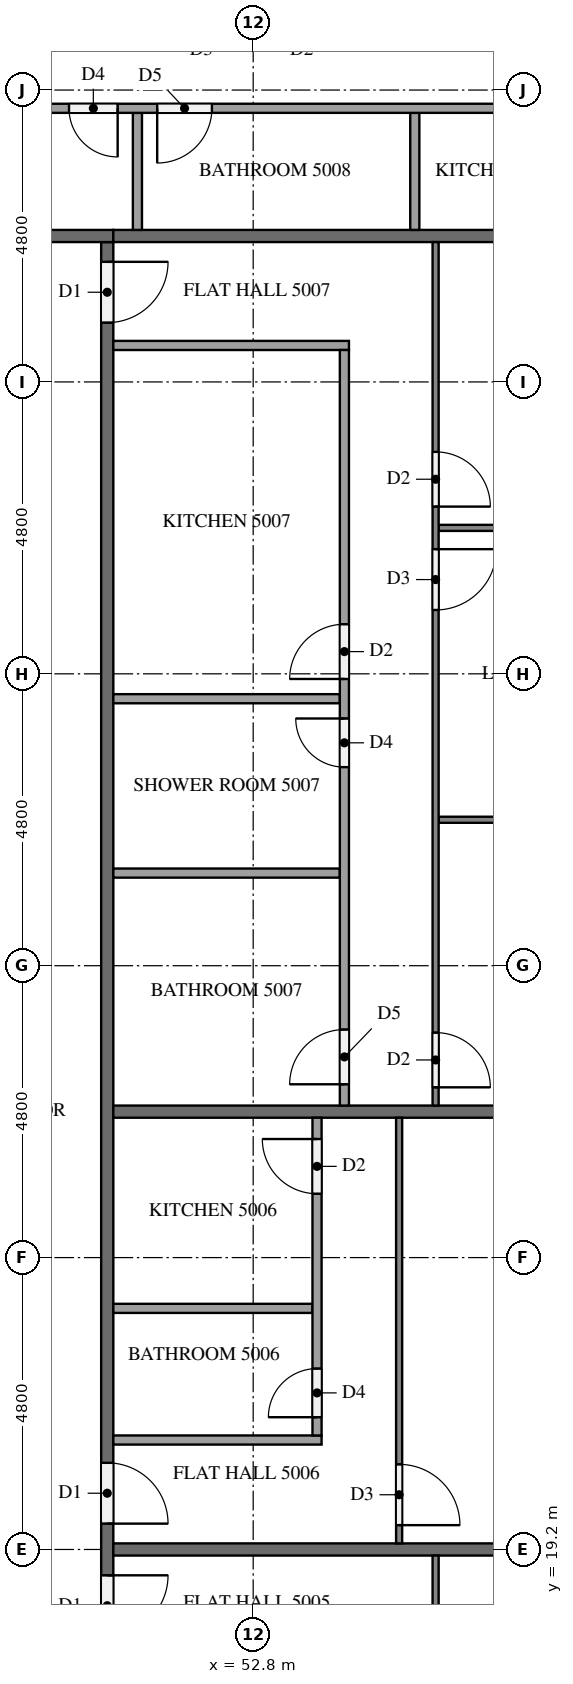
"""IFC4 building model, lengths in metres.
Left out: names, types, materials, properties, quantities, classifications, styles, units other than length and angle.
Written with IfcOpenShell. Run it as: python <this file> out.ifc"""

import sys

from ifc_helpers import new_model, si_unit, direction, frame, frame_2d, origin, place, context, subcontext, project, spatial, rectangle, extrude, element, fill, save


model = new_model("IFC4")
c1 = context("Model", 3, precision=1e-05, world=origin(), true_north=direction((0.0, 1.0)))
c2 = subcontext(c1, "Body", "Model", "MODEL_VIEW")
j1 = project(units=[si_unit("LENGTHUNIT", "METRE"), si_unit("PLANEANGLEUNIT", "RADIAN")], contexts=[c1])
p1 = place(None, origin())
s1 = spatial("IfcSite", under=j1, at=p1, CompositionType="ELEMENT")
p2 = place(p1, origin())
s2 = spatial("IfcBuilding", under=s1, at=p2, CompositionType="ELEMENT")
p3 = place(p2, frame((0.0, 0.0, 192.9)))
s3 = spatial("IfcBuildingStorey", under=s2, at=p3, CompositionType="ELEMENT", Elevation=192.9)
p4 = place(p3, frame((50.4, 40.7, 0.0), z_axis=(0.0, 0.0, 1.0), x_axis=(0.0, -1.0, 0.0)))
e1 = element("IfcWall", 1, at=p4, inside=s3, PredefinedType="PARTITIONING", context=c2, shape_type="SweptSolid", body=[
    extrude(rectangle(XDim=28.6, YDim=0.2, at=frame_2d((14.3, 0.0))), origin(), (0.0, 0.0, 1.0), 3.2),
])
p5 = place(p4, frame((21.925, 0.0, 0.0)))
e2 = element("IfcOpeningElement", 2, at=p5, cuts=e1, PredefinedType="OPENING", context=c2, shape_type="SweptSolid", body=[
    extrude(rectangle(XDim=1.0, YDim=2.1, at=frame_2d((0.5, 1.05))), frame((0.0, 0.11, 0.0), z_axis=(0.0, -1.0, 0.0), x_axis=(1.0, 0.0, 0.0)), (0.0, 0.0, 1.0), 0.22),
])
p6 = place(p4, frame((20.075, 0.0, 0.0)))
e3 = element("IfcOpeningElement", 3, at=p6, cuts=e1, PredefinedType="OPENING", context=c2, shape_type="SweptSolid", body=[
    extrude(rectangle(XDim=1.0, YDim=2.1, at=frame_2d((0.5, 1.05))), frame((0.0, 0.11, 0.0), z_axis=(0.0, -1.0, 0.0), x_axis=(1.0, 0.0, 0.0)), (0.0, 0.0, 1.0), 0.22),
])
p7 = place(p4, frame((0.325, 0.0, 0.0)))
e4 = element("IfcOpeningElement", 4, at=p7, cuts=e1, PredefinedType="OPENING", context=c2, shape_type="SweptSolid", body=[
    extrude(rectangle(XDim=1.0, YDim=2.1, at=frame_2d((0.5, 1.05))), frame((0.0, 0.11, 0.0), z_axis=(0.0, -1.0, 0.0), x_axis=(1.0, 0.0, 0.0)), (0.0, 0.0, 1.0), 0.22),
])
p8 = place(p3, frame((11.9, 40.8, 0.0), z_axis=(0.0, 0.0, 1.0), x_axis=(1.0, 0.0, 0.0)))
e5 = element("IfcWall", 5, at=p8, inside=s3, PredefinedType="PARTITIONING", context=c2, shape_type="SweptSolid", body=[
    extrude(rectangle(XDim=38.6, YDim=0.2, at=frame_2d((19.3, 0.0))), origin(), (0.0, 0.0, 1.0), 3.2),
])
p9 = place(p8, frame((34.125, 0.0, 0.0)))
e6 = element("IfcOpeningElement", 6, at=p9, cuts=e5, PredefinedType="OPENING", context=c2, shape_type="SweptSolid", body=[
    extrude(rectangle(XDim=1.0, YDim=2.1, at=frame_2d((0.5, 1.05))), frame((0.0, 0.11, 0.0), z_axis=(0.0, -1.0, 0.0), x_axis=(1.0, 0.0, 0.0)), (0.0, 0.0, 1.0), 0.22),
])
p10 = place(p8, frame((24.525, 0.0, 0.0)))
e7 = element("IfcOpeningElement", 7, at=p10, cuts=e5, PredefinedType="OPENING", context=c2, shape_type="SweptSolid", body=[
    extrude(rectangle(XDim=1.0, YDim=2.1, at=frame_2d((0.5, 1.05))), frame((0.0, 0.11, 0.0), z_axis=(0.0, -1.0, 0.0), x_axis=(1.0, 0.0, 0.0)), (0.0, 0.0, 1.0), 0.22),
])
p11 = place(p8, frame((7.725, 0.0, 0.0)))
e8 = element("IfcOpeningElement", 8, at=p11, cuts=e5, PredefinedType="OPENING", context=c2, shape_type="SweptSolid", body=[
    extrude(rectangle(XDim=1.0, YDim=2.1, at=frame_2d((0.5, 1.05))), frame((0.0, 0.11, 0.0), z_axis=(0.0, -1.0, 0.0), x_axis=(1.0, 0.0, 0.0)), (0.0, 0.0, 1.0), 0.22),
])
p12 = place(p8, frame((5.875, 0.0, 0.0)))
e9 = element("IfcOpeningElement", 9, at=p12, cuts=e5, PredefinedType="OPENING", context=c2, shape_type="SweptSolid", body=[
    extrude(rectangle(XDim=1.0, YDim=2.1, at=frame_2d((0.5, 1.05))), frame((0.0, 0.11, 0.0), z_axis=(0.0, -1.0, 0.0), x_axis=(1.0, 0.0, 0.0)), (0.0, 0.0, 1.0), 0.22),
])
for number, where, z_axis, x_axis in (
    (10, (50.5, 19.2, 0.0), (0.0, 0.0, 1.0), (1.0, 0.0, 0.0)),
    (11, (50.5, 26.4, 0.0), (0.0, 0.0, 1.0), (1.0, 0.0, 0.0)),
    (12, (50.5, 40.8, 0.0), (0.0, 0.0, 1.0), (1.0, 0.0, 0.0)),
):
    element("IfcWall", number, at=place(p3, frame(where, z_axis=z_axis, x_axis=x_axis)), inside=s3, PredefinedType="PARTITIONING", context=c2, shape_type="SweptSolid", body=[
        extrude(rectangle(XDim=11.8, YDim=0.2, at=frame_2d((5.9, 0.0))), origin(), (0.0, 0.0, 1.0), 3.2),
    ])
p13 = place(p3, frame((55.8, 19.1, 0.0), z_axis=(0.0, 0.0, 1.0), x_axis=(0.0, -1.0, 0.0)))
e13 = element("IfcWall", 13, at=p13, inside=s3, PredefinedType="PARTITIONING", context=c2, shape_type="SweptSolid", body=[
    extrude(rectangle(XDim=7.0, YDim=0.1, at=frame_2d((3.5, 0.0))), origin(), (0.0, 0.0, 1.0), 3.2),
])
p14 = place(p13, frame((5.7, 0.0, 0.0)))
e14 = element("IfcOpeningElement", 14, at=p14, cuts=e13, PredefinedType="OPENING", context=c2, shape_type="SweptSolid", body=[
    extrude(rectangle(XDim=1.0, YDim=2.1, at=frame_2d((0.5, 1.05))), frame((0.0, 0.06, 0.0), z_axis=(0.0, -1.0, 0.0), x_axis=(1.0, 0.0, 0.0)), (0.0, 0.0, 1.0), 0.12),
])
p15 = place(p3, frame((55.2, 26.3, 0.0), z_axis=(0.0, 0.0, 1.0), x_axis=(0.0, -1.0, 0.0)))
e15 = element("IfcWall", 15, at=p15, inside=s3, PredefinedType="PARTITIONING", context=c2, shape_type="SweptSolid", body=[
    extrude(rectangle(XDim=7.0, YDim=0.1, at=frame_2d((3.5, 0.0))), origin(), (0.0, 0.0, 1.0), 3.2),
])
p16 = place(p15, frame((5.7, 0.0, 0.0)))
e16 = element("IfcOpeningElement", 16, at=p16, cuts=e15, PredefinedType="OPENING", context=c2, shape_type="SweptSolid", body=[
    extrude(rectangle(XDim=1.0, YDim=2.1, at=frame_2d((0.5, 1.05))), frame((0.0, 0.06, 0.0), z_axis=(0.0, -1.0, 0.0), x_axis=(1.0, 0.0, 0.0)), (0.0, 0.0, 1.0), 0.12),
])
p17 = place(p3, frame((50.5, 23.165, 0.0), z_axis=(0.0, 0.0, 1.0), x_axis=(1.0, 0.0, 0.0)))
e17 = element("IfcWall", 17, at=p17, inside=s3, PredefinedType="PARTITIONING", context=c2, shape_type="SweptSolid", body=[
    extrude(rectangle(XDim=3.275, YDim=0.15, at=frame_2d((1.637, 0.0))), origin(), (0.0, 0.0, 1.0), 3.2),
])
p18 = place(p3, frame((50.5, 21.0, 0.0), z_axis=(0.0, 0.0, 1.0), x_axis=(1.0, 0.0, 0.0)))
e18 = element("IfcWall", 18, at=p18, inside=s3, PredefinedType="PARTITIONING", context=c2, shape_type="SweptSolid", body=[
    extrude(rectangle(XDim=3.425, YDim=0.15, at=frame_2d((1.712, 0.0))), origin(), (0.0, 0.0, 1.0), 3.2),
])
p19 = place(p3, frame((53.85, 21.075, 0.0), z_axis=(0.0, 0.0, 1.0), x_axis=(0.0, 1.0, 0.0)))
e19 = element("IfcWall", 19, at=p19, inside=s3, PredefinedType="PARTITIONING", context=c2, shape_type="SweptSolid", body=[
    extrude(rectangle(XDim=5.225, YDim=0.15, at=frame_2d((2.613, 0.0))), origin(), (0.0, 0.0, 1.0), 3.2),
])
p20 = place(p19, frame((0.3, 0.0, 0.0)))
e20 = element("IfcOpeningElement", 20, at=p20, cuts=e19, PredefinedType="OPENING", context=c2, shape_type="SweptSolid", body=[
    extrude(rectangle(XDim=0.8, YDim=2.1, at=frame_2d((0.4, 1.05))), frame((0.0, 0.085, 0.0), z_axis=(0.0, -1.0, 0.0), x_axis=(1.0, 0.0, 0.0)), (0.0, 0.0, 1.0), 0.17),
])
p21 = place(p19, frame((3.975, 0.0, 0.0)))
e21 = element("IfcOpeningElement", 21, at=p21, cuts=e19, PredefinedType="OPENING", context=c2, shape_type="SweptSolid", body=[
    extrude(rectangle(XDim=0.9, YDim=2.1, at=frame_2d((0.45, 1.05))), frame((0.0, 0.085, 0.0), z_axis=(0.0, -1.0, 0.0), x_axis=(1.0, 0.0, 0.0)), (0.0, 0.0, 1.0), 0.17),
])
for number, where, z_axis, x_axis in (
    (22, (55.85, 36.0, 0.0), (0.0, 0.0, 1.0), (1.0, 0.0, 0.0)),
    (23, (55.85, 31.2, 0.0), (0.0, 0.0, 1.0), (1.0, 0.0, 0.0)),
):
    element("IfcWall", number, at=place(p3, frame(where, z_axis=z_axis, x_axis=x_axis)), inside=s3, PredefinedType="PARTITIONING", context=c2, shape_type="SweptSolid", body=[
        extrude(rectangle(XDim=6.45, YDim=0.1, at=frame_2d((3.225, 0.0))), origin(), (0.0, 0.0, 1.0), 3.2),
    ])
p22 = place(p3, frame((55.8, 40.7, 0.0), z_axis=(0.0, 0.0, 1.0), x_axis=(0.0, -1.0, 0.0)))
e24 = element("IfcWall", 24, at=p22, inside=s3, PredefinedType="PARTITIONING", context=c2, shape_type="SweptSolid", body=[
    extrude(rectangle(XDim=14.2, YDim=0.1, at=frame_2d((7.1, 0.0))), origin(), (0.0, 0.0, 1.0), 3.2),
])
p23 = place(p22, frame((3.45, 0.0, 0.0)))
e25 = element("IfcOpeningElement", 25, at=p23, cuts=e24, PredefinedType="OPENING", context=c2, shape_type="SweptSolid", body=[
    extrude(rectangle(XDim=0.9, YDim=2.1, at=frame_2d((0.45, 1.05))), frame((0.0, 0.06, 0.0), z_axis=(0.0, -1.0, 0.0), x_axis=(1.0, 0.0, 0.0)), (0.0, 0.0, 1.0), 0.12),
])
p24 = place(p22, frame((5.05, 0.0, 0.0)))
e26 = element("IfcOpeningElement", 26, at=p24, cuts=e24, PredefinedType="OPENING", context=c2, shape_type="SweptSolid", body=[
    extrude(rectangle(XDim=1.0, YDim=2.1, at=frame_2d((0.5, 1.05))), frame((0.0, 0.06, 0.0), z_axis=(0.0, -1.0, 0.0), x_axis=(1.0, 0.0, 0.0)), (0.0, 0.0, 1.0), 0.12),
])
p25 = place(p22, frame((13.0, 0.0, 0.0)))
e27 = element("IfcOpeningElement", 27, at=p25, cuts=e24, PredefinedType="OPENING", context=c2, shape_type="SweptSolid", body=[
    extrude(rectangle(XDim=0.9, YDim=2.1, at=frame_2d((0.45, 1.05))), frame((0.0, 0.06, 0.0), z_axis=(0.0, -1.0, 0.0), x_axis=(1.0, 0.0, 0.0)), (0.0, 0.0, 1.0), 0.12),
])
for number, where, z_axis, x_axis in (
    (28, (50.5, 33.19, 0.0), (0.0, 0.0, 1.0), (1.0, 0.0, 0.0)),
    (29, (50.5, 30.323, 0.0), (0.0, 0.0, 1.0), (1.0, 0.0, 0.0)),
):
    element("IfcWall", number, at=place(p3, frame(where, z_axis=z_axis, x_axis=x_axis)), inside=s3, PredefinedType="PARTITIONING", context=c2, shape_type="SweptSolid", body=[
        extrude(rectangle(XDim=3.725, YDim=0.15, at=frame_2d((1.863, 0.0))), origin(), (0.0, 0.0, 1.0), 3.2),
    ])
p26 = place(p3, frame((50.5, 39.0, 0.0), z_axis=(0.0, 0.0, 1.0), x_axis=(1.0, 0.0, 0.0)))
e30 = element("IfcWall", 30, at=p26, inside=s3, PredefinedType="PARTITIONING", context=c2, shape_type="SweptSolid", body=[
    extrude(rectangle(XDim=3.875, YDim=0.15, at=frame_2d((1.938, 0.0))), origin(), (0.0, 0.0, 1.0), 3.2),
])
p27 = place(p3, frame((54.3, 26.5, 0.0), z_axis=(0.0, 0.0, 1.0), x_axis=(0.0, 1.0, 0.0)))
e31 = element("IfcWall", 31, at=p27, inside=s3, PredefinedType="PARTITIONING", context=c2, shape_type="SweptSolid", body=[
    extrude(rectangle(XDim=12.425, YDim=0.15, at=frame_2d((6.212, 0.0))), origin(), (0.0, 0.0, 1.0), 3.2),
])
p28 = place(p27, frame((7.015, 0.0, 0.0)))
e32 = element("IfcOpeningElement", 32, at=p28, cuts=e31, PredefinedType="OPENING", context=c2, shape_type="SweptSolid", body=[
    extrude(rectangle(XDim=0.9, YDim=2.1, at=frame_2d((0.45, 1.05))), frame((0.0, 0.085, 0.0), z_axis=(0.0, -1.0, 0.0), x_axis=(1.0, 0.0, 0.0)), (0.0, 0.0, 1.0), 0.17),
])
p29 = place(p27, frame((5.565, 0.0, 0.0)))
e33 = element("IfcOpeningElement", 33, at=p29, cuts=e31, PredefinedType="OPENING", context=c2, shape_type="SweptSolid", body=[
    extrude(rectangle(XDim=0.8, YDim=2.1, at=frame_2d((0.4, 1.05))), frame((0.0, 0.085, 0.0), z_axis=(0.0, -1.0, 0.0), x_axis=(1.0, 0.0, 0.0)), (0.0, 0.0, 1.0), 0.17),
])
p30 = place(p27, frame((0.35, 0.0, 0.0)))
e34 = element("IfcOpeningElement", 34, at=p30, cuts=e31, PredefinedType="OPENING", context=c2, shape_type="SweptSolid", body=[
    extrude(rectangle(XDim=0.9, YDim=2.1, at=frame_2d((0.45, 1.05))), frame((0.0, 0.085, 0.0), z_axis=(0.0, -1.0, 0.0), x_axis=(1.0, 0.0, 0.0)), (0.0, 0.0, 1.0), 0.17),
])
for number, where, z_axis, x_axis in (
    (35, (50.896, 40.9, 0.0), (0.0, 0.0, 1.0), (0.0, 1.0, 0.0)),
    (36, (55.458, 40.9, 0.0), (0.0, 0.0, 1.0), (0.0, 1.0, 0.0)),
):
    element("IfcWall", number, at=place(p3, frame(where, z_axis=z_axis, x_axis=x_axis)), inside=s3, PredefinedType="PARTITIONING", context=c2, shape_type="SweptSolid", body=[
        extrude(rectangle(XDim=1.925, YDim=0.15, at=frame_2d((0.962, 0.0))), origin(), (0.0, 0.0, 1.0), 3.2),
    ])
p31 = place(p3, frame((61.925, 42.9, 0.0), z_axis=(0.0, 0.0, 1.0), x_axis=(-1.0, 0.0, 0.0)))
e37 = element("IfcWall", 37, at=p31, inside=s3, PredefinedType="PARTITIONING", context=c2, shape_type="SweptSolid", body=[
    extrude(rectangle(XDim=14.45, YDim=0.15, at=frame_2d((7.225, 0.0))), origin(), (0.0, 0.0, 1.0), 3.2),
])
p32 = place(p31, frame((11.354, 0.0, 0.0)))
e38 = element("IfcOpeningElement", 38, at=p32, cuts=e37, PredefinedType="OPENING", context=c2, shape_type="SweptSolid", body=[
    extrude(rectangle(XDim=0.8, YDim=2.1, at=frame_2d((0.4, 1.05))), frame((0.0, 0.085, 0.0), z_axis=(0.0, -1.0, 0.0), x_axis=(1.0, 0.0, 0.0)), (0.0, 0.0, 1.0), 0.17),
])
p33 = place(p31, frame((9.804, 0.0, 0.0)))
e39 = element("IfcOpeningElement", 39, at=p33, cuts=e37, PredefinedType="OPENING", context=c2, shape_type="SweptSolid", body=[
    extrude(rectangle(XDim=0.9, YDim=2.1, at=frame_2d((0.45, 1.05))), frame((0.0, 0.085, 0.0), z_axis=(0.0, -1.0, 0.0), x_axis=(1.0, 0.0, 0.0)), (0.0, 0.0, 1.0), 0.17),
])
p34 = place(p31, frame((0.3, 0.0, 0.0)))
e40 = element("IfcOpeningElement", 40, at=p34, cuts=e37, PredefinedType="OPENING", context=c2, shape_type="SweptSolid", body=[
    extrude(rectangle(XDim=0.9, YDim=2.1, at=frame_2d((0.45, 1.05))), frame((0.0, 0.085, 0.0), z_axis=(0.0, -1.0, 0.0), x_axis=(1.0, 0.0, 0.0)), (0.0, 0.0, 1.0), 0.17),
])
p35 = place(p5, origin())
e41 = element("IfcDoor", 41, at=p35, inside=s3, OperationType="SINGLE_SWING_LEFT", PredefinedType="DOOR", context=c2, shape_type="SweptSolid", body=[
    extrude(rectangle(XDim=1.0, YDim=2.1, at=frame_2d((0.5, 1.05))), frame((0.0, 0.025, 0.0), z_axis=(0.0, -1.0, 0.0), x_axis=(1.0, 0.0, 0.0)), (0.0, 0.0, 1.0), 0.05),
])
fill(e2, e41)
p36 = place(p6, origin())
e42 = element("IfcDoor", 42, at=p36, inside=s3, OperationType="SINGLE_SWING_RIGHT", PredefinedType="DOOR", context=c2, shape_type="SweptSolid", body=[
    extrude(rectangle(XDim=1.0, YDim=2.1, at=frame_2d((0.5, 1.05))), frame((0.0, 0.025, 0.0), z_axis=(0.0, -1.0, 0.0), x_axis=(1.0, 0.0, 0.0)), (0.0, 0.0, 1.0), 0.05),
])
fill(e3, e42)
p37 = place(p7, origin())
e43 = element("IfcDoor", 43, at=p37, inside=s3, OperationType="SINGLE_SWING_LEFT", PredefinedType="DOOR", context=c2, shape_type="SweptSolid", body=[
    extrude(rectangle(XDim=1.0, YDim=2.1, at=frame_2d((0.5, 1.05))), frame((0.0, 0.025, 0.0), z_axis=(0.0, -1.0, 0.0), x_axis=(1.0, 0.0, 0.0)), (0.0, 0.0, 1.0), 0.05),
])
fill(e4, e43)
p38 = place(p16, origin())
e44 = element("IfcDoor", 44, at=p38, inside=s3, OperationType="SINGLE_SWING_RIGHT", PredefinedType="DOOR", context=c2, shape_type="SweptSolid", body=[
    extrude(rectangle(XDim=1.0, YDim=2.1, at=frame_2d((0.5, 1.05))), frame((0.0, 0.025, 0.0), z_axis=(0.0, -1.0, 0.0), x_axis=(1.0, 0.0, 0.0)), (0.0, 0.0, 1.0), 0.05),
])
fill(e16, e44)
p39 = place(p20, origin())
e45 = element("IfcDoor", 45, at=p39, inside=s3, OperationType="SINGLE_SWING_LEFT", PredefinedType="DOOR", context=c2, shape_type="SweptSolid", body=[
    extrude(rectangle(XDim=0.8, YDim=2.1, at=frame_2d((0.4, 1.05))), frame((0.0, 0.025, 0.0), z_axis=(0.0, -1.0, 0.0), x_axis=(1.0, 0.0, 0.0)), (0.0, 0.0, 1.0), 0.05),
])
fill(e20, e45)
p40 = place(p21, origin())
e46 = element("IfcDoor", 46, at=p40, inside=s3, OperationType="SINGLE_SWING_RIGHT", PredefinedType="DOOR", context=c2, shape_type="SweptSolid", body=[
    extrude(rectangle(XDim=0.9, YDim=2.1, at=frame_2d((0.45, 1.05))), frame((0.0, 0.025, 0.0), z_axis=(0.0, -1.0, 0.0), x_axis=(1.0, 0.0, 0.0)), (0.0, 0.0, 1.0), 0.05),
])
fill(e21, e46)
p41 = place(p23, origin())
e47 = element("IfcDoor", 47, at=p41, inside=s3, OperationType="SINGLE_SWING_RIGHT", PredefinedType="DOOR", context=c2, shape_type="SweptSolid", body=[
    extrude(rectangle(XDim=0.9, YDim=2.1, at=frame_2d((0.45, 1.05))), frame((0.0, 0.025, 0.0), z_axis=(0.0, -1.0, 0.0), x_axis=(1.0, 0.0, 0.0)), (0.0, 0.0, 1.0), 0.05),
])
fill(e25, e47)
p42 = place(p24, origin())
e48 = element("IfcDoor", 48, at=p42, inside=s3, OperationType="SINGLE_SWING_LEFT", PredefinedType="DOOR", context=c2, shape_type="SweptSolid", body=[
    extrude(rectangle(XDim=1.0, YDim=2.1, at=frame_2d((0.5, 1.05))), frame((0.0, 0.025, 0.0), z_axis=(0.0, -1.0, 0.0), x_axis=(1.0, 0.0, 0.0)), (0.0, 0.0, 1.0), 0.05),
])
fill(e26, e48)
p43 = place(p25, origin())
e49 = element("IfcDoor", 49, at=p43, inside=s3, OperationType="SINGLE_SWING_RIGHT", PredefinedType="DOOR", context=c2, shape_type="SweptSolid", body=[
    extrude(rectangle(XDim=0.9, YDim=2.1, at=frame_2d((0.45, 1.05))), frame((0.0, 0.025, 0.0), z_axis=(0.0, -1.0, 0.0), x_axis=(1.0, 0.0, 0.0)), (0.0, 0.0, 1.0), 0.05),
])
fill(e27, e49)
p44 = place(p28, origin())
e50 = element("IfcDoor", 50, at=p44, inside=s3, OperationType="SINGLE_SWING_LEFT", PredefinedType="DOOR", context=c2, shape_type="SweptSolid", body=[
    extrude(rectangle(XDim=0.9, YDim=2.1, at=frame_2d((0.45, 1.05))), frame((0.0, 0.025, 0.0), z_axis=(0.0, -1.0, 0.0), x_axis=(1.0, 0.0, 0.0)), (0.0, 0.0, 1.0), 0.05),
])
fill(e32, e50)
p45 = place(p29, origin())
e51 = element("IfcDoor", 51, at=p45, inside=s3, OperationType="SINGLE_SWING_RIGHT", PredefinedType="DOOR", context=c2, shape_type="SweptSolid", body=[
    extrude(rectangle(XDim=0.8, YDim=2.1, at=frame_2d((0.4, 1.05))), frame((0.0, 0.025, 0.0), z_axis=(0.0, -1.0, 0.0), x_axis=(1.0, 0.0, 0.0)), (0.0, 0.0, 1.0), 0.05),
])
fill(e33, e51)
p46 = place(p30, origin())
e52 = element("IfcDoor", 52, at=p46, inside=s3, OperationType="SINGLE_SWING_LEFT", PredefinedType="DOOR", context=c2, shape_type="SweptSolid", body=[
    extrude(rectangle(XDim=0.9, YDim=2.1, at=frame_2d((0.45, 1.05))), frame((0.0, 0.025, 0.0), z_axis=(0.0, -1.0, 0.0), x_axis=(1.0, 0.0, 0.0)), (0.0, 0.0, 1.0), 0.05),
])
fill(e34, e52)
p47 = place(p32, origin())
e53 = element("IfcDoor", 53, at=p47, inside=s3, OperationType="SINGLE_SWING_LEFT", PredefinedType="DOOR", context=c2, shape_type="SweptSolid", body=[
    extrude(rectangle(XDim=0.8, YDim=2.1, at=frame_2d((0.4, 1.05))), frame((0.0, 0.025, 0.0), z_axis=(0.0, -1.0, 0.0), x_axis=(1.0, 0.0, 0.0)), (0.0, 0.0, 1.0), 0.05),
])
fill(e38, e53)
p48 = place(p33, origin())
e54 = element("IfcDoor", 54, at=p48, inside=s3, OperationType="SINGLE_SWING_RIGHT", PredefinedType="DOOR", context=c2, shape_type="SweptSolid", body=[
    extrude(rectangle(XDim=0.9, YDim=2.1, at=frame_2d((0.45, 1.05))), frame((0.0, 0.025, 0.0), z_axis=(0.0, -1.0, 0.0), x_axis=(1.0, 0.0, 0.0)), (0.0, 0.0, 1.0), 0.05),
])
fill(e39, e54)
save(model, sys.argv[1])
